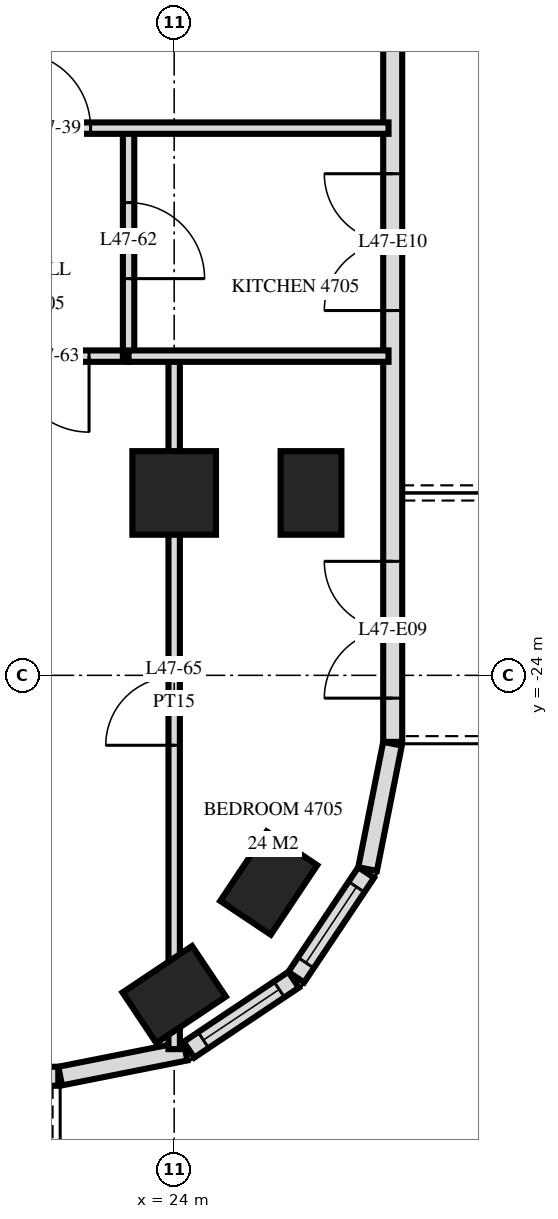
"""IFC4 building model, lengths in metres.
Left out: names, types, materials, properties, quantities, classifications, styles, units other than length and angle.
Written with IfcOpenShell. Run it as: python <this file> out.ifc"""

import sys

from ifc_helpers import new_model, si_unit, direction, frame, frame_2d, origin, origin_2d, place, context, subcontext, project, spatial, rectangle, extrude, element, fill, save


model = new_model("IFC4")
c1 = context("Model", 3, precision=1e-05, world=origin(), true_north=direction((0.0, 1.0)))
c2 = subcontext(c1, "Body", "Model", "MODEL_VIEW")
j1 = project(units=[si_unit("LENGTHUNIT", "METRE"), si_unit("PLANEANGLEUNIT", "RADIAN")], contexts=[c1])
p1 = place(None, origin())
s1 = spatial("IfcSite", under=j1, at=p1, CompositionType="ELEMENT")
p2 = place(p1, origin())
s2 = spatial("IfcBuilding", under=s1, at=p2, CompositionType="ELEMENT")
p3 = place(p2, frame((0.0, 0.0, 183.6)))
s3 = spatial("IfcBuildingStorey", under=s2, at=p3, CompositionType="ELEMENT", Elevation=183.6)
p4 = place(p3, frame((24.0, -28.2, -0.28), z_axis=(0.0, 0.0, 1.0), x_axis=(0.831459915646, 0.555584744817, 0.0)))
e1 = element("IfcColumn", 1, at=p4, inside=s3, PredefinedType="COLUMN", context=c2, shape_type="SweptSolid", body=[
    extrude(rectangle(XDim=1.1, YDim=0.8, at=origin_2d()), origin(), (0.0, 0.0, 1.0), 3.78),
])
p5 = place(p3, frame((24.0, -21.6, -0.28), z_axis=(0.0, 0.0, 1.0), x_axis=(1.0, 0.0, 0.0)))
e2 = element("IfcColumn", 2, at=p5, inside=s3, PredefinedType="COLUMN", context=c2, shape_type="SweptSolid", body=[
    extrude(rectangle(XDim=1.1, YDim=1.1, at=origin_2d()), origin(), (0.0, 0.0, 1.0), 3.78),
])
for number, where, z_axis, x_axis in (
    (3, (25.244, -26.733, -0.28), (0.0, 0.0, 1.0), (0.556, 0.831, 0.0)),
    (4, (25.8, -21.6, -0.28), (0.0, 0.0, 1.0), (0.0, 1.0, 0.0)),
):
    element("IfcColumn", number, at=place(p3, frame(where, z_axis=z_axis, x_axis=x_axis)), inside=s3, PredefinedType="COLUMN", context=c2, shape_type="SweptSolid", body=[
        extrude(rectangle(XDim=1.1, YDim=0.8, at=origin_2d()), origin(), (0.0, 0.0, 1.0), 3.78),
    ])
p6 = place(p3, frame((-22.475, -29.275, 0.0), z_axis=(0.0, 0.0, 1.0), x_axis=(1.0, 0.0, 0.0)))
e5 = element("IfcWall", 5, at=p6, inside=s3, PredefinedType="SOLIDWALL", context=c2, shape_type="SweptSolid", body=[
    extrude(rectangle(XDim=44.951, YDim=0.25, at=frame_2d((22.475, 0.0))), origin(), (0.0, 0.0, 1.0), 3.22),
])
p7 = place(p6, frame((0.575, 0.0, 0.0)))
e6 = element("IfcOpeningElement", 6, at=p7, cuts=e5, PredefinedType="OPENING", context=c2, shape_type="SweptSolid", body=[
    extrude(rectangle(XDim=1.8, YDim=2.4, at=frame_2d((0.9, 1.2))), frame((0.0, 0.135, 0.0), z_axis=(0.0, -1.0, 0.0), x_axis=(1.0, 0.0, 0.0)), (0.0, 0.0, 1.0), 0.27),
])
p8 = place(p6, frame((4.775, 0.0, 0.9)))
e7 = element("IfcOpeningElement", 7, at=p8, cuts=e5, PredefinedType="OPENING", context=c2, shape_type="SweptSolid", body=[
    extrude(rectangle(XDim=2.4, YDim=1.5, at=frame_2d((1.2, 0.75))), frame((0.0, 0.135, 0.0), z_axis=(0.0, -1.0, 0.0), x_axis=(1.0, 0.0, 0.0)), (0.0, 0.0, 1.0), 0.27),
])
p9 = place(p6, frame((8.075, 0.0, 0.0)))
e8 = element("IfcOpeningElement", 8, at=p9, cuts=e5, PredefinedType="OPENING", context=c2, shape_type="SweptSolid", body=[
    extrude(rectangle(XDim=1.8, YDim=2.4, at=frame_2d((0.9, 1.2))), frame((0.0, 0.135, 0.0), z_axis=(0.0, -1.0, 0.0), x_axis=(1.0, 0.0, 0.0)), (0.0, 0.0, 1.0), 0.27),
])
p10 = place(p6, frame((11.075, 0.0, 0.0)))
e9 = element("IfcOpeningElement", 9, at=p10, cuts=e5, PredefinedType="OPENING", context=c2, shape_type="SweptSolid", body=[
    extrude(rectangle(XDim=1.8, YDim=2.4, at=frame_2d((0.9, 1.2))), frame((0.0, 0.135, 0.0), z_axis=(0.0, -1.0, 0.0), x_axis=(1.0, 0.0, 0.0)), (0.0, 0.0, 1.0), 0.27),
])
p11 = place(p6, frame((13.775, 0.0, 0.9)))
e10 = element("IfcOpeningElement", 10, at=p11, cuts=e5, PredefinedType="OPENING", context=c2, shape_type="SweptSolid", body=[
    extrude(rectangle(XDim=2.4, YDim=1.5, at=frame_2d((1.2, 0.75))), frame((0.0, 0.135, 0.0), z_axis=(0.0, -1.0, 0.0), x_axis=(1.0, 0.0, 0.0)), (0.0, 0.0, 1.0), 0.27),
])
p12 = place(p6, frame((20.075, 0.0, 0.0)))
e11 = element("IfcOpeningElement", 11, at=p12, cuts=e5, PredefinedType="OPENING", context=c2, shape_type="SweptSolid", body=[
    extrude(rectangle(XDim=1.8, YDim=2.4, at=frame_2d((0.9, 1.2))), frame((0.0, 0.135, 0.0), z_axis=(0.0, -1.0, 0.0), x_axis=(1.0, 0.0, 0.0)), (0.0, 0.0, 1.0), 0.27),
])
p13 = place(p6, frame((23.075, 0.0, 0.0)))
e12 = element("IfcOpeningElement", 12, at=p13, cuts=e5, PredefinedType="OPENING", context=c2, shape_type="SweptSolid", body=[
    extrude(rectangle(XDim=1.8, YDim=2.4, at=frame_2d((0.9, 1.2))), frame((0.0, 0.135, 0.0), z_axis=(0.0, -1.0, 0.0), x_axis=(1.0, 0.0, 0.0)), (0.0, 0.0, 1.0), 0.27),
])
p14 = place(p6, frame((29.075, 0.0, 0.0)))
e13 = element("IfcOpeningElement", 13, at=p14, cuts=e5, PredefinedType="OPENING", context=c2, shape_type="SweptSolid", body=[
    extrude(rectangle(XDim=1.8, YDim=2.4, at=frame_2d((0.9, 1.2))), frame((0.0, 0.135, 0.0), z_axis=(0.0, -1.0, 0.0), x_axis=(1.0, 0.0, 0.0)), (0.0, 0.0, 1.0), 0.27),
])
p15 = place(p6, frame((31.775, 0.0, 0.9)))
e14 = element("IfcOpeningElement", 14, at=p15, cuts=e5, PredefinedType="OPENING", context=c2, shape_type="SweptSolid", body=[
    extrude(rectangle(XDim=2.4, YDim=1.5, at=frame_2d((1.2, 0.75))), frame((0.0, 0.135, 0.0), z_axis=(0.0, -1.0, 0.0), x_axis=(1.0, 0.0, 0.0)), (0.0, 0.0, 1.0), 0.27),
])
p16 = place(p6, frame((35.075, 0.0, 0.0)))
e15 = element("IfcOpeningElement", 15, at=p16, cuts=e5, PredefinedType="OPENING", context=c2, shape_type="SweptSolid", body=[
    extrude(rectangle(XDim=1.8, YDim=2.4, at=frame_2d((0.9, 1.2))), frame((0.0, 0.135, 0.0), z_axis=(0.0, -1.0, 0.0), x_axis=(1.0, 0.0, 0.0)), (0.0, 0.0, 1.0), 0.27),
])
p17 = place(p6, frame((37.775, 0.0, 0.9)))
e16 = element("IfcOpeningElement", 16, at=p17, cuts=e5, PredefinedType="OPENING", context=c2, shape_type="SweptSolid", body=[
    extrude(rectangle(XDim=2.4, YDim=1.5, at=frame_2d((1.2, 0.75))), frame((0.0, 0.135, 0.0), z_axis=(0.0, -1.0, 0.0), x_axis=(1.0, 0.0, 0.0)), (0.0, 0.0, 1.0), 0.27),
])
p18 = place(p6, frame((41.075, 0.0, 0.0)))
e17 = element("IfcOpeningElement", 17, at=p18, cuts=e5, PredefinedType="OPENING", context=c2, shape_type="SweptSolid", body=[
    extrude(rectangle(XDim=1.8, YDim=2.4, at=frame_2d((0.9, 1.2))), frame((0.0, 0.135, 0.0), z_axis=(0.0, -1.0, 0.0), x_axis=(1.0, 0.0, 0.0)), (0.0, 0.0, 1.0), 0.27),
])
p19 = place(p3, frame((22.5, -29.273, 0.0), z_axis=(0.0, 0.0, 1.0), x_axis=(0.980775640221, 0.19513878023, 0.0)))
e18 = element("IfcWall", 18, at=p19, inside=s3, PredefinedType="SOLIDWALL", context=c2, shape_type="SweptSolid", body=[
    extrude(rectangle(XDim=1.681, YDim=0.25, at=frame_2d((0.841, 0.0))), origin(), (0.0, 0.0, 1.0), 3.22),
])
p20 = place(p3, frame((24.194, -28.926, 0.0), z_axis=(0.0, 0.0, 1.0), x_axis=(0.831482937015, 0.55555029066, 0.0)))
e19 = element("IfcWall", 19, at=p20, inside=s3, PredefinedType="SOLIDWALL", context=c2, shape_type="SweptSolid", body=[
    extrude(rectangle(XDim=1.656, YDim=0.25, at=frame_2d((0.828, 0.0))), origin(), (0.0, 0.0, 1.0), 3.22),
])
p21 = place(p20, frame((0.228, 0.0, 0.9)))
e20 = element("IfcOpeningElement", 20, at=p21, cuts=e19, PredefinedType="OPENING", context=c2, shape_type="SweptSolid", body=[
    extrude(rectangle(XDim=1.2, YDim=1.5, at=frame_2d((0.6, 0.75))), frame((0.0, 0.135, 0.0), z_axis=(0.0, -1.0, 0.0), x_axis=(1.0, 0.0, 0.0)), (0.0, 0.0, 1.0), 0.27),
])
p22 = place(p3, frame((25.606, -27.971, 0.0), z_axis=(0.0, 0.0, 1.0), x_axis=(0.55555029066, 0.831482937015, 0.0)))
e21 = element("IfcWall", 21, at=p22, inside=s3, PredefinedType="SOLIDWALL", context=c2, shape_type="SweptSolid", body=[
    extrude(rectangle(XDim=1.656, YDim=0.25, at=frame_2d((0.828, 0.0))), origin(), (0.0, 0.0, 1.0), 3.22),
])
p23 = place(p22, frame((0.228, 0.0, 0.9)))
e22 = element("IfcOpeningElement", 22, at=p23, cuts=e21, PredefinedType="OPENING", context=c2, shape_type="SweptSolid", body=[
    extrude(rectangle(XDim=1.2, YDim=1.5, at=frame_2d((0.6, 0.75))), frame((0.0, 0.135, 0.0), z_axis=(0.0, -1.0, 0.0), x_axis=(1.0, 0.0, 0.0)), (0.0, 0.0, 1.0), 0.27),
])
p24 = place(p3, frame((26.545, -26.549, 0.0), z_axis=(0.0, 0.0, 1.0), x_axis=(0.195026884138, 0.980797896849, 0.0)))
e23 = element("IfcWall", 23, at=p24, inside=s3, PredefinedType="SOLIDWALL", context=c2, shape_type="SweptSolid", body=[
    extrude(rectangle(XDim=1.681, YDim=0.25, at=frame_2d((0.841, 0.0))), origin(), (0.0, 0.0, 1.0), 3.22),
])
p25 = place(p3, frame((26.875, -24.875, 0.0), z_axis=(0.0, 0.0, 1.0), x_axis=(0.0, 1.0, 0.0)))
e24 = element("IfcWall", 24, at=p25, inside=s3, PredefinedType="SOLIDWALL", context=c2, shape_type="SweptSolid", body=[
    extrude(rectangle(XDim=21.551, YDim=0.25, at=frame_2d((10.775, 0.0))), origin(), (0.0, 0.0, 1.0), 3.22),
])
p26 = place(p25, frame((0.575, 0.0, 0.0)))
e25 = element("IfcOpeningElement", 25, at=p26, cuts=e24, PredefinedType="OPENING", context=c2, shape_type="SweptSolid", body=[
    extrude(rectangle(XDim=1.8, YDim=2.4, at=frame_2d((0.9, 1.2))), frame((0.0, 0.135, 0.0), z_axis=(0.0, -1.0, 0.0), x_axis=(1.0, 0.0, 0.0)), (0.0, 0.0, 1.0), 0.27),
])
p27 = place(p25, frame((5.675, 0.0, 0.0)))
e26 = element("IfcOpeningElement", 26, at=p27, cuts=e24, PredefinedType="OPENING", context=c2, shape_type="SweptSolid", body=[
    extrude(rectangle(XDim=1.8, YDim=2.4, at=frame_2d((0.9, 1.2))), frame((0.0, 0.135, 0.0), z_axis=(0.0, -1.0, 0.0), x_axis=(1.0, 0.0, 0.0)), (0.0, 0.0, 1.0), 0.27),
])
p28 = place(p25, frame((10.175, 0.0, 0.9)))
e27 = element("IfcOpeningElement", 27, at=p28, cuts=e24, PredefinedType="OPENING", context=c2, shape_type="SweptSolid", body=[
    extrude(rectangle(XDim=2.4, YDim=1.5, at=frame_2d((1.2, 0.75))), frame((0.0, 0.135, 0.0), z_axis=(0.0, -1.0, 0.0), x_axis=(1.0, 0.0, 0.0)), (0.0, 0.0, 1.0), 0.27),
])
p29 = place(p25, frame((13.475, 0.0, 0.0)))
e28 = element("IfcOpeningElement", 28, at=p29, cuts=e24, PredefinedType="OPENING", context=c2, shape_type="SweptSolid", body=[
    extrude(rectangle(XDim=1.8, YDim=2.4, at=frame_2d((0.9, 1.2))), frame((0.0, 0.135, 0.0), z_axis=(0.0, -1.0, 0.0), x_axis=(1.0, 0.0, 0.0)), (0.0, 0.0, 1.0), 0.27),
])
p30 = place(p3, frame((24.0, -28.918, 0.0), z_axis=(0.0, 0.0, 1.0), x_axis=(0.0, 1.0, 0.0)))
e29 = element("IfcWall", 29, at=p30, inside=s3, PredefinedType="PARTITIONING", context=c2, shape_type="SweptSolid", body=[
    extrude(rectangle(XDim=9.118, YDim=0.15, at=frame_2d((4.559, 0.0))), origin(), (0.0, 0.0, 1.0), 3.22),
])
p31 = place(p30, frame((3.998, 0.0, 0.0)))
e30 = element("IfcOpeningElement", 30, at=p31, cuts=e29, PredefinedType="OPENING", context=c2, shape_type="SweptSolid", body=[
    extrude(rectangle(XDim=0.9, YDim=2.1, at=frame_2d((0.45, 1.05))), frame((0.0, 0.085, 0.0), z_axis=(0.0, -1.0, 0.0), x_axis=(1.0, 0.0, 0.0)), (0.0, 0.0, 1.0), 0.17),
])
p32 = place(p3, frame((23.4, -19.8, 0.0), z_axis=(0.0, 0.0, 1.0), x_axis=(0.0, 1.0, 0.0)))
e31 = element("IfcWall", 31, at=p32, inside=s3, PredefinedType="PARTITIONING", context=c2, shape_type="SweptSolid", body=[
    extrude(rectangle(XDim=3.0, YDim=0.15, at=frame_2d((1.5, 0.0))), origin(), (0.0, 0.0, 1.0), 3.22),
])
p33 = place(p32, frame((1.02, 0.0, 0.0)))
e32 = element("IfcOpeningElement", 32, at=p33, cuts=e31, PredefinedType="OPENING", context=c2, shape_type="SweptSolid", body=[
    extrude(rectangle(XDim=1.0, YDim=2.1, at=frame_2d((0.5, 1.05))), frame((0.0, 0.085, 0.0), z_axis=(0.0, -1.0, 0.0), x_axis=(1.0, 0.0, 0.0)), (0.0, 0.0, 1.0), 0.17),
])
p34 = place(p3, frame((21.4, -19.8, 0.0), z_axis=(0.0, 0.0, 1.0), x_axis=(1.0, 0.0, 0.0)))
e33 = element("IfcWall", 33, at=p34, inside=s3, PredefinedType="PARTITIONING", context=c2, shape_type="SweptSolid", body=[
    extrude(rectangle(XDim=2.0, YDim=0.15, at=frame_2d((1.0, 0.0))), origin(), (0.0, 0.0, 1.0), 3.22),
])
p35 = place(p34, frame((0.48, 0.0, 0.0)))
e34 = element("IfcOpeningElement", 34, at=p35, cuts=e33, PredefinedType="OPENING", context=c2, shape_type="SweptSolid", body=[
    extrude(rectangle(XDim=1.0, YDim=2.1, at=frame_2d((0.5, 1.05))), frame((0.0, 0.085, 0.0), z_axis=(0.0, -1.0, 0.0), x_axis=(1.0, 0.0, 0.0)), (0.0, 0.0, 1.0), 0.17),
])
p36 = place(p3, frame((23.4, -19.8, 0.0), z_axis=(0.0, 0.0, 1.0), x_axis=(1.0, 0.0, 0.0)))
e35 = element("IfcWall", 35, at=p36, inside=s3, PredefinedType="PARTITIONING", context=c2, shape_type="SweptSolid", body=[
    extrude(rectangle(XDim=3.42, YDim=0.15, at=frame_2d((1.71, 0.0))), origin(), (0.0, 0.0, 1.0), 3.22),
])
p37 = place(p3, frame((-26.82, -16.8, 0.0), z_axis=(0.0, 0.0, 1.0), x_axis=(1.0, 0.0, 0.0)))
e36 = element("IfcWall", 36, at=p37, inside=s3, PredefinedType="PARTITIONING", context=c2, shape_type="SweptSolid", body=[
    extrude(rectangle(XDim=53.64, YDim=0.15, at=frame_2d((26.82, 0.0))), origin(), (0.0, 0.0, 1.0), 3.22),
])
p38 = place(p37, frame((11.97, 0.0, 0.0)))
e37 = element("IfcOpeningElement", 37, at=p38, cuts=e36, PredefinedType="OPENING", context=c2, shape_type="SweptSolid", body=[
    extrude(rectangle(XDim=1.0, YDim=2.1, at=frame_2d((0.5, 1.05))), frame((0.0, 0.085, 0.0), z_axis=(0.0, -1.0, 0.0), x_axis=(1.0, 0.0, 0.0)), (0.0, 0.0, 1.0), 0.17),
])
p39 = place(p37, frame((10.67, 0.0, 0.0)))
e38 = element("IfcOpeningElement", 38, at=p39, cuts=e36, PredefinedType="OPENING", context=c2, shape_type="SweptSolid", body=[
    extrude(rectangle(XDim=1.0, YDim=2.1, at=frame_2d((0.5, 1.05))), frame((0.0, 0.085, 0.0), z_axis=(0.0, -1.0, 0.0), x_axis=(1.0, 0.0, 0.0)), (0.0, 0.0, 1.0), 0.17),
])
p40 = place(p37, frame((3.22, 0.0, 0.0)))
e39 = element("IfcOpeningElement", 39, at=p40, cuts=e36, PredefinedType="OPENING", context=c2, shape_type="SweptSolid", body=[
    extrude(rectangle(XDim=1.0, YDim=2.1, at=frame_2d((0.5, 1.05))), frame((0.0, 0.085, 0.0), z_axis=(0.0, -1.0, 0.0), x_axis=(1.0, 0.0, 0.0)), (0.0, 0.0, 1.0), 0.17),
])
p41 = place(p37, frame((5.02, 0.0, 0.0)))
e40 = element("IfcOpeningElement", 40, at=p41, cuts=e36, PredefinedType="OPENING", context=c2, shape_type="SweptSolid", body=[
    extrude(rectangle(XDim=1.0, YDim=2.1, at=frame_2d((0.5, 1.05))), frame((0.0, 0.085, 0.0), z_axis=(0.0, -1.0, 0.0), x_axis=(1.0, 0.0, 0.0)), (0.0, 0.0, 1.0), 0.17),
])
p42 = place(p37, frame((38.97, 0.0, 0.0)))
e41 = element("IfcOpeningElement", 41, at=p42, cuts=e36, PredefinedType="OPENING", context=c2, shape_type="SweptSolid", body=[
    extrude(rectangle(XDim=1.0, YDim=2.1, at=frame_2d((0.5, 1.05))), frame((0.0, 0.085, 0.0), z_axis=(0.0, -1.0, 0.0), x_axis=(1.0, 0.0, 0.0)), (0.0, 0.0, 1.0), 0.17),
])
p43 = place(p37, frame((48.72, 0.0, 0.0)))
e42 = element("IfcOpeningElement", 42, at=p43, cuts=e36, PredefinedType="OPENING", context=c2, shape_type="SweptSolid", body=[
    extrude(rectangle(XDim=1.0, YDim=2.1, at=frame_2d((0.5, 1.05))), frame((0.0, 0.085, 0.0), z_axis=(0.0, -1.0, 0.0), x_axis=(1.0, 0.0, 0.0)), (0.0, 0.0, 1.0), 0.17),
])
p44 = place(p37, frame((46.92, 0.0, 0.0)))
e43 = element("IfcOpeningElement", 43, at=p44, cuts=e36, PredefinedType="OPENING", context=c2, shape_type="SweptSolid", body=[
    extrude(rectangle(XDim=1.0, YDim=2.1, at=frame_2d((0.5, 1.05))), frame((0.0, 0.085, 0.0), z_axis=(0.0, -1.0, 0.0), x_axis=(1.0, 0.0, 0.0)), (0.0, 0.0, 1.0), 0.17),
])
p45 = place(p37, frame((18.32, 0.0, 0.0)))
e44 = element("IfcOpeningElement", 44, at=p45, cuts=e36, PredefinedType="OPENING", context=c2, shape_type="SweptSolid", body=[
    extrude(rectangle(XDim=1.0, YDim=2.1, at=frame_2d((0.5, 1.05))), frame((0.0, 0.085, 0.0), z_axis=(0.0, -1.0, 0.0), x_axis=(1.0, 0.0, 0.0)), (0.0, 0.0, 1.0), 0.17),
])
p46 = place(p37, frame((26.32, 0.0, 0.0)))
e45 = element("IfcOpeningElement", 45, at=p46, cuts=e36, PredefinedType="OPENING", context=c2, shape_type="SweptSolid", body=[
    extrude(rectangle(XDim=1.0, YDim=2.1, at=frame_2d((0.5, 1.05))), frame((0.0, 0.085, 0.0), z_axis=(0.0, -1.0, 0.0), x_axis=(1.0, 0.0, 0.0)), (0.0, 0.0, 1.0), 0.17),
])
p47 = place(p37, frame((34.32, 0.0, 0.0)))
e46 = element("IfcOpeningElement", 46, at=p47, cuts=e36, PredefinedType="OPENING", context=c2, shape_type="SweptSolid", body=[
    extrude(rectangle(XDim=1.0, YDim=2.1, at=frame_2d((0.5, 1.05))), frame((0.0, 0.085, 0.0), z_axis=(0.0, -1.0, 0.0), x_axis=(1.0, 0.0, 0.0)), (0.0, 0.0, 1.0), 0.17),
])
p48 = place(p21, origin())
e47 = element("IfcWindow", 47, at=p48, inside=s3, PartitioningType="SINGLE_PANEL", PredefinedType="WINDOW", context=c2, shape_type="SweptSolid", body=[
    extrude(rectangle(XDim=1.2, YDim=1.5, at=frame_2d((0.6, 0.75))), frame((0.0, 0.03, 0.0), z_axis=(0.0, -1.0, 0.0), x_axis=(1.0, 0.0, 0.0)), (0.0, 0.0, 1.0), 0.06),
])
fill(e20, e47)
p49 = place(p23, origin())
e48 = element("IfcWindow", 48, at=p49, inside=s3, PartitioningType="SINGLE_PANEL", PredefinedType="WINDOW", context=c2, shape_type="SweptSolid", body=[
    extrude(rectangle(XDim=1.2, YDim=1.5, at=frame_2d((0.6, 0.75))), frame((0.0, 0.03, 0.0), z_axis=(0.0, -1.0, 0.0), x_axis=(1.0, 0.0, 0.0)), (0.0, 0.0, 1.0), 0.06),
])
fill(e22, e48)
p50 = place(p26, origin())
e49 = element("IfcDoor", 49, at=p50, inside=s3, OperationType="DOUBLE_DOOR_SINGLE_SWING", PredefinedType="DOOR", context=c2, shape_type="SweptSolid", body=[
    extrude(rectangle(XDim=1.8, YDim=2.4, at=frame_2d((0.9, 1.2))), frame((0.0, 0.025, 0.0), z_axis=(0.0, -1.0, 0.0), x_axis=(1.0, 0.0, 0.0)), (0.0, 0.0, 1.0), 0.05),
])
fill(e25, e49)
p51 = place(p27, origin())
e50 = element("IfcDoor", 50, at=p51, inside=s3, OperationType="DOUBLE_DOOR_SINGLE_SWING", PredefinedType="DOOR", context=c2, shape_type="SweptSolid", body=[
    extrude(rectangle(XDim=1.8, YDim=2.4, at=frame_2d((0.9, 1.2))), frame((0.0, 0.025, 0.0), z_axis=(0.0, -1.0, 0.0), x_axis=(1.0, 0.0, 0.0)), (0.0, 0.0, 1.0), 0.05),
])
fill(e26, e50)
p52 = place(p43, origin())
e51 = element("IfcDoor", 51, at=p52, inside=s3, OperationType="SINGLE_SWING_RIGHT", PredefinedType="DOOR", context=c2, shape_type="SweptSolid", body=[
    extrude(rectangle(XDim=1.0, YDim=2.1, at=frame_2d((0.5, 1.05))), frame((0.0, 0.025, 0.0), z_axis=(0.0, -1.0, 0.0), x_axis=(1.0, 0.0, 0.0)), (0.0, 0.0, 1.0), 0.05),
])
fill(e42, e51)
p53 = place(p33, frame((0.5, 0.0, 0.0), z_axis=(0.0, 0.0, 1.0), x_axis=(-1.0, 0.0, 0.0)))
e52 = element("IfcDoor", 52, at=p53, inside=s3, OperationType="SINGLE_SWING_LEFT", PredefinedType="DOOR", context=c2, shape_type="SweptSolid", body=[
    extrude(rectangle(XDim=1.0, YDim=2.1, at=frame_2d((0.0, 1.05))), frame((0.0, -0.025, 0.0), z_axis=(0.0, 1.0, 0.0), x_axis=(-1.0, 0.0, 0.0)), (0.0, 0.0, 1.0), 0.05),
])
fill(e32, e52)
p54 = place(p35, frame((0.5, 0.0, 0.0), z_axis=(0.0, 0.0, 1.0), x_axis=(-1.0, 0.0, 0.0)))
e53 = element("IfcDoor", 53, at=p54, inside=s3, OperationType="SINGLE_SWING_RIGHT", PredefinedType="DOOR", context=c2, shape_type="SweptSolid", body=[
    extrude(rectangle(XDim=1.0, YDim=2.1, at=frame_2d((0.0, 1.05))), frame((0.0, -0.025, 0.0), z_axis=(0.0, 1.0, 0.0), x_axis=(-1.0, 0.0, 0.0)), (0.0, 0.0, 1.0), 0.05),
])
fill(e34, e53)
p55 = place(p31, origin())
e54 = element("IfcDoor", 54, at=p55, inside=s3, OperationType="SINGLE_SWING_RIGHT", PredefinedType="DOOR", context=c2, shape_type="SweptSolid", body=[
    extrude(rectangle(XDim=0.9, YDim=2.1, at=frame_2d((0.45, 1.05))), frame((0.0, 0.025, 0.0), z_axis=(0.0, -1.0, 0.0), x_axis=(1.0, 0.0, 0.0)), (0.0, 0.0, 1.0), 0.05),
])
fill(e30, e54)
save(model, sys.argv[1])
